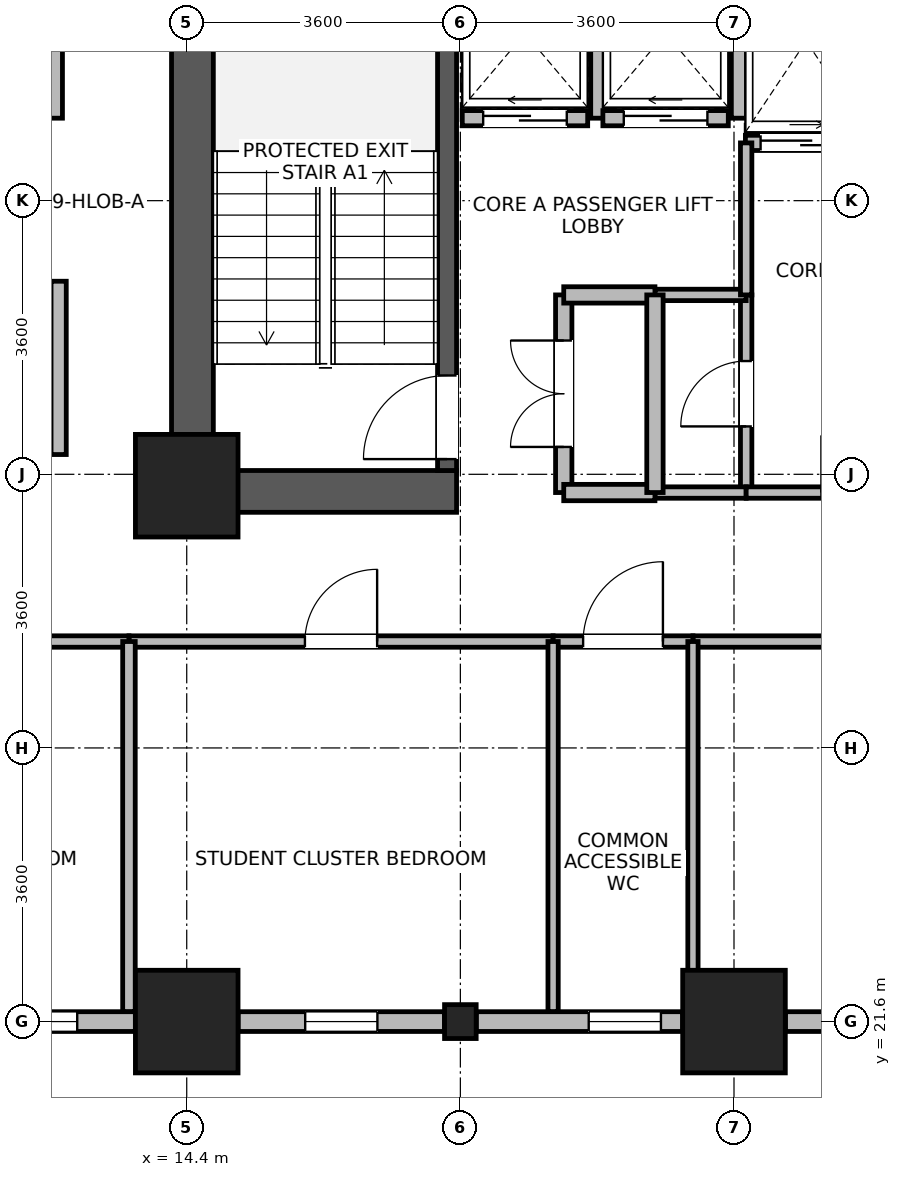
"""IFC4 building model, lengths in metres.
Left out: names, types, materials, properties, quantities, classifications, styles, units other than length and angle.
Written with IfcOpenShell. Run it as: python <this file> out.ifc"""

import sys

from ifc_helpers import new_model, si_unit, direction, frame, frame_2d, origin, origin_2d, place, context, subcontext, project, spatial, rectangle, i_section, extrude, source, transform, mapped, element, fill, save


model = new_model("IFC4")
c1 = context("Model", 3, precision=1e-05, world=origin(), true_north=direction((0.0, 1.0)))
c2 = subcontext(c1, "Body", "Model", "MODEL_VIEW")
j1 = project(units=[si_unit("LENGTHUNIT", "METRE"), si_unit("PLANEANGLEUNIT", "RADIAN")], contexts=[c1])
p1 = place(None, origin())
s1 = spatial("IfcSite", under=j1, at=p1, CompositionType="ELEMENT")
p2 = place(p1, origin())
s2 = spatial("IfcBuilding", under=s1, at=p2, CompositionType="ELEMENT")
p3 = place(p2, frame((0.0, 0.0, 40.1)))
s3 = spatial("IfcBuildingStorey", under=s2, at=p3, CompositionType="ELEMENT", Elevation=40.1)
p4 = place(p3, frame((14.475, 28.3, 0.0), z_axis=(0.0, 0.0, 1.0), x_axis=(0.0, 1.0, 0.0)))
e1 = element("IfcWall", 1, at=p4, inside=s3, PredefinedType="SHEAR", context=c2, shape_type="SweptSolid", body=[
    extrude(rectangle(XDim=8.1, YDim=0.55, at=frame_2d((4.05, 0.0))), origin(), (0.0, 0.0, 1.0), 3.45),
])
p5 = place(p3, frame((14.75, 28.575, 0.0), z_axis=(0.0, 0.0, 1.0), x_axis=(1.0, 0.0, 0.0)))
e2 = element("IfcWall", 2, at=p5, inside=s3, PredefinedType="SHEAR", context=c2, shape_type="SweptSolid", body=[
    extrude(rectangle(XDim=3.2, YDim=0.55, at=frame_2d((1.6, 0.0))), origin(), (0.0, 0.0, 1.0), 3.45),
])
p6 = place(p3, frame((17.825, 28.85, 0.0), z_axis=(0.0, 0.0, 1.0), x_axis=(0.0, 1.0, 0.0)))
e3 = element("IfcWall", 3, at=p6, inside=s3, PredefinedType="SHEAR", context=c2, shape_type="SweptSolid", body=[
    extrude(rectangle(XDim=7.0, YDim=0.25, at=frame_2d((3.5, 0.0))), origin(), (0.0, 0.0, 1.0), 3.45),
])
p7 = place(p6, frame((0.15, 0.0, 0.0)))
e4 = element("IfcOpeningElement", 4, at=p7, cuts=e3, PredefinedType="OPENING", context=c2, shape_type="SweptSolid", body=[
    extrude(rectangle(XDim=1.1, YDim=2.08, at=frame_2d((0.55, 1.04))), frame((0.0, 0.135, 0.0), z_axis=(0.0, -1.0, 0.0), x_axis=(1.0, 0.0, 0.0)), (0.0, 0.0, 1.0), 0.27),
])
m1 = source(origin(), c2, "Body", "SweptSolid", [
    extrude(rectangle(XDim=1.35, YDim=1.35, at=origin_2d()), origin(), (0.0, 0.0, 1.0), 3.7),
])
for number, where, z_axis, x_axis in (
    (5, (14.4, 21.6, 0.0), (0.0, 0.0, 1.0), (1.0, 0.0, 0.0)),
    (6, (14.4, 28.65, 0.0), (0.0, 0.0, 1.0), (1.0, 0.0, 0.0)),
    (7, (21.6, 21.6, 0.0), (0.0, 0.0, 1.0), (1.0, 0.0, 0.0)),
):
    element("IfcColumn", number, at=place(p3, frame(where, z_axis=z_axis, x_axis=x_axis)), inside=s3, PredefinedType="COLUMN", context=c2, shape_type="MappedRepresentation", body=[
        mapped(m1, transform((0.0, 0.0, 0.0), x_axis=(1.0, 0.0, 0.0), y_axis=(0.0, 1.0, 0.0), z_axis=(0.0, 0.0, 1.0), scale=1.0)),
    ])
m2 = source(origin(), c2, "Body", "SweptSolid", [
    extrude(i_section(OverallWidth=0.416, OverallDepth=0.446, WebThickness=0.029, FlangeThickness=0.04, FilletRadius=0.015, at=origin_2d()), origin(), (0.0, 0.0, 1.0), 3.7),
])
p8 = place(p3, frame((18.0, 21.6, 0.0), z_axis=(0.0, 0.0, 1.0), x_axis=(1.0, 0.0, 0.0)))
e8 = element("IfcColumn", 8, at=p8, inside=s3, PredefinedType="COLUMN", context=c2, shape_type="MappedRepresentation", body=[
    mapped(m2, transform((0.0, 0.0, 0.0), x_axis=(1.0, 0.0, 0.0), y_axis=(0.0, 1.0, 0.0), z_axis=(0.0, 0.0, 1.0), scale=1.0)),
])
p9 = place(p3, frame((13.724, 21.6, 0.0), z_axis=(0.0, 0.0, 1.0), x_axis=(-1.0, 0.0, 0.0)))
e9 = element("IfcWall", 9, at=p9, inside=s3, PredefinedType="STANDARD", context=c2, shape_type="SweptSolid", body=[
    extrude(rectangle(XDim=9.989, YDim=0.26, at=frame_2d((4.995, 0.0))), origin(), (0.0, 0.0, 1.0), 3.43),
])
p10 = place(p9, frame((0.765, 0.0, 0.85)))
e10 = element("IfcOpeningElement", 10, at=p10, cuts=e9, PredefinedType="OPENING", context=c2, shape_type="SweptSolid", body=[
    extrude(rectangle(XDim=1.8, YDim=1.85, at=frame_2d((0.9, 0.925))), frame((0.0, 0.14, 0.0), z_axis=(0.0, -1.0, 0.0), x_axis=(1.0, 0.0, 0.0)), (0.0, 0.0, 1.0), 0.28),
])
p11 = place(p9, frame((7.424, 0.0, 0.85)))
e11 = element("IfcOpeningElement", 11, at=p11, cuts=e9, PredefinedType="OPENING", context=c2, shape_type="SweptSolid", body=[
    extrude(rectangle(XDim=1.8, YDim=1.85, at=frame_2d((0.9, 0.925))), frame((0.0, 0.14, 0.0), z_axis=(0.0, -1.0, 0.0), x_axis=(1.0, 0.0, 0.0)), (0.0, 0.0, 1.0), 0.28),
])
p12 = place(p3, frame((17.791, 21.6, 0.0), z_axis=(0.0, 0.0, 1.0), x_axis=(-1.0, 0.0, 0.0)))
e12 = element("IfcWall", 12, at=p12, inside=s3, PredefinedType="STANDARD", context=c2, shape_type="SweptSolid", body=[
    extrude(rectangle(XDim=2.715, YDim=0.26, at=frame_2d((1.357, 0.0))), origin(), (0.0, 0.0, 1.0), 2.93),
])
p13 = place(p12, frame((0.883, 0.0, 0.85)))
e13 = element("IfcOpeningElement", 13, at=p13, cuts=e12, PredefinedType="OPENING", context=c2, shape_type="SweptSolid", body=[
    extrude(rectangle(XDim=0.95, YDim=1.75, at=frame_2d((0.475, 0.875))), frame((0.0, 0.14, 0.0), z_axis=(0.0, -1.0, 0.0), x_axis=(1.0, 0.0, 0.0)), (0.0, 0.0, 1.0), 0.28),
])
p14 = place(p3, frame((20.924, 21.6, 0.0), z_axis=(0.0, 0.0, 1.0), x_axis=(-1.0, 0.0, 0.0)))
e14 = element("IfcWall", 14, at=p14, inside=s3, PredefinedType="STANDARD", context=c2, shape_type="SweptSolid", body=[
    extrude(rectangle(XDim=2.715, YDim=0.26, at=frame_2d((1.357, 0.0))), origin(), (0.0, 0.0, 1.0), 2.93),
])
p15 = place(p14, frame((0.285, 0.0, 0.85)))
e15 = element("IfcOpeningElement", 15, at=p15, cuts=e14, PredefinedType="OPENING", context=c2, shape_type="SweptSolid", body=[
    extrude(rectangle(XDim=0.95, YDim=1.75, at=frame_2d((0.475, 0.875))), frame((0.0, 0.14, 0.0), z_axis=(0.0, -1.0, 0.0), x_axis=(1.0, 0.0, 0.0)), (0.0, 0.0, 1.0), 0.28),
])
p16 = place(p3, frame((24.991, 21.6, 0.0), z_axis=(0.0, 0.0, 1.0), x_axis=(-1.0, 0.0, 0.0)))
e16 = element("IfcWall", 16, at=p16, inside=s3, PredefinedType="STANDARD", context=c2, shape_type="SweptSolid", body=[
    extrude(rectangle(XDim=2.715, YDim=0.26, at=frame_2d((1.357, 0.0))), origin(), (0.0, 0.0, 1.0), 2.93),
])
p17 = place(p16, frame((0.883, 0.0, 0.85)))
e17 = element("IfcOpeningElement", 17, at=p17, cuts=e16, PredefinedType="OPENING", context=c2, shape_type="SweptSolid", body=[
    extrude(rectangle(XDim=0.95, YDim=1.75, at=frame_2d((0.475, 0.875))), frame((0.0, 0.14, 0.0), z_axis=(0.0, -1.0, 0.0), x_axis=(1.0, 0.0, 0.0)), (0.0, 0.0, 1.0), 0.28),
])
p18 = place(p3, frame((18.025, 33.485, 0.0), z_axis=(0.0, 0.0, 1.0), x_axis=(1.0, 0.0, 0.0)))
e18 = element("IfcWall", 18, at=p18, inside=s3, PredefinedType="PARTITIONING", context=c2, shape_type="SweptSolid", body=[
    extrude(rectangle(XDim=1.65, YDim=0.2, at=frame_2d((0.825, 0.0))), origin(), (0.0, 0.0, 1.0), 3.43),
])
p19 = place(p18, frame((0.275, 0.0, 0.0)))
e19 = element("IfcOpeningElement", 19, at=p19, cuts=e18, PredefinedType="OPENING", context=c2, shape_type="SweptSolid", body=[
    extrude(rectangle(XDim=1.1, YDim=2.12, at=frame_2d((0.55, 1.06))), frame((0.0, 0.11, 0.0), z_axis=(0.0, -1.0, 0.0), x_axis=(1.0, 0.0, 0.0)), (0.0, 0.0, 1.0), 0.22),
])
p20 = place(p3, frame((19.815, 33.485, 0.0), z_axis=(0.0, 0.0, 1.0), x_axis=(0.0, 1.0, 0.0)))
e20 = element("IfcWall", 20, at=p20, inside=s3, PredefinedType="PARTITIONING", context=c2, shape_type="SweptSolid", body=[
    extrude(rectangle(XDim=2.23, YDim=0.2, at=frame_2d((1.115, 0.0))), origin(), (0.0, 0.0, 1.0), 3.43),
])
p21 = place(p3, frame((19.875, 33.485, 0.0), z_axis=(0.0, 0.0, 1.0), x_axis=(1.0, 0.0, 0.0)))
e21 = element("IfcWall", 21, at=p21, inside=s3, PredefinedType="PARTITIONING", context=c2, shape_type="SweptSolid", body=[
    extrude(rectangle(XDim=1.65, YDim=0.2, at=frame_2d((0.825, 0.0))), origin(), (0.0, 0.0, 1.0), 3.43),
])
p22 = place(p21, frame((0.275, 0.0, 0.0)))
e22 = element("IfcOpeningElement", 22, at=p22, cuts=e21, PredefinedType="OPENING", context=c2, shape_type="SweptSolid", body=[
    extrude(rectangle(XDim=1.1, YDim=2.12, at=frame_2d((0.55, 1.06))), frame((0.0, 0.11, 0.0), z_axis=(0.0, -1.0, 0.0), x_axis=(1.0, 0.0, 0.0)), (0.0, 0.0, 1.0), 0.22),
])
p23 = place(p3, frame((21.665, 33.485, 0.0), z_axis=(0.0, 0.0, 1.0), x_axis=(0.0, 1.0, 0.0)))
e23 = element("IfcWall", 23, at=p23, inside=s3, PredefinedType="PARTITIONING", context=c2, shape_type="SweptSolid", body=[
    extrude(rectangle(XDim=2.23, YDim=0.2, at=frame_2d((1.115, 0.0))), origin(), (0.0, 0.0, 1.0), 3.43),
])
p24 = place(p3, frame((12.715, 29.06, 0.0), z_axis=(0.0, 0.0, 1.0), x_axis=(0.0, 1.0, 0.0)))
e24 = element("IfcWall", 24, at=p24, inside=s3, PredefinedType="PARTITIONING", context=c2, shape_type="SweptSolid", body=[
    extrude(rectangle(XDim=2.28, YDim=0.2, at=frame_2d((1.14, 0.0))), origin(), (0.0, 0.0, 1.0), 3.43),
])
p25 = place(p3, frame((12.665, 33.485, 0.0), z_axis=(0.0, 0.0, 1.0), x_axis=(0.0, 1.0, 0.0)))
e25 = element("IfcWall", 25, at=p25, inside=s3, PredefinedType="PARTITIONING", context=c2, shape_type="SweptSolid", body=[
    extrude(rectangle(XDim=2.23, YDim=0.2, at=frame_2d((1.115, 0.0))), origin(), (0.0, 0.0, 1.0), 3.43),
])
p26 = place(p3, frame((21.75, 33.16, 0.0), z_axis=(0.0, 0.0, 1.0), x_axis=(1.0, 0.0, 0.0)))
e26 = element("IfcWall", 26, at=p26, inside=s3, PredefinedType="PARTITIONING", context=c2, shape_type="SweptSolid", body=[
    extrude(rectangle(XDim=1.6, YDim=0.2, at=frame_2d((0.8, 0.0))), origin(), (0.0, 0.0, 1.0), 3.43),
])
p27 = place(p26, frame((0.2, 0.0, 0.0)))
e27 = element("IfcOpeningElement", 27, at=p27, cuts=e26, PredefinedType="OPENING", context=c2, shape_type="SweptSolid", body=[
    extrude(rectangle(XDim=1.2, YDim=2.12, at=frame_2d((0.6, 1.06))), frame((0.0, 0.11, 0.0), z_axis=(0.0, -1.0, 0.0), x_axis=(1.0, 0.0, 0.0)), (0.0, 0.0, 1.0), 0.22),
])
p28 = place(p3, frame((21.06, 26.6, 0.0), z_axis=(0.0, 0.0, 1.0), x_axis=(1.0, 0.0, 0.0)))
e28 = element("IfcWall", 28, at=p28, inside=s3, PredefinedType="PARTITIONING", context=c2, shape_type="SweptSolid", body=[
    extrude(rectangle(XDim=12.3, YDim=0.15, at=frame_2d((6.15, 0.0))), origin(), (0.0, 0.0, 1.0), 3.43),
])
p29 = place(p28, frame((5.5, 0.0, 0.0)))
e29 = element("IfcOpeningElement", 29, at=p29, cuts=e28, PredefinedType="OPENING", context=c2, shape_type="SweptSolid", body=[
    extrude(rectangle(XDim=1.3, YDim=2.12, at=frame_2d((0.65, 1.06))), frame((0.0, 0.085, 0.0), z_axis=(0.0, -1.0, 0.0), x_axis=(1.0, 0.0, 0.0)), (0.0, 0.0, 1.0), 0.17),
])
p30 = place(p3, frame((13.64, 26.6, 0.0), z_axis=(0.0, 0.0, 1.0), x_axis=(1.0, 0.0, 0.0)))
e30 = element("IfcWall", 30, at=p30, inside=s3, PredefinedType="PARTITIONING", context=c2, shape_type="SweptSolid", body=[
    extrude(rectangle(XDim=5.58, YDim=0.15, at=frame_2d((2.79, 0.0))), origin(), (0.0, 0.0, 1.0), 3.43),
])
p31 = place(p30, frame((2.315, 0.0, 0.0)))
e31 = element("IfcOpeningElement", 31, at=p31, cuts=e30, PredefinedType="OPENING", context=c2, shape_type="SweptSolid", body=[
    extrude(rectangle(XDim=0.95, YDim=2.1, at=frame_2d((0.475, 1.05))), frame((0.0, 0.085, 0.0), z_axis=(0.0, -1.0, 0.0), x_axis=(1.0, 0.0, 0.0)), (0.0, 0.0, 1.0), 0.17),
])
p32 = place(p3, frame((8.44, 26.6, 0.0), z_axis=(0.0, 0.0, 1.0), x_axis=(1.0, 0.0, 0.0)))
e32 = element("IfcWall", 32, at=p32, inside=s3, PredefinedType="PARTITIONING", context=c2, shape_type="SweptSolid", body=[
    extrude(rectangle(XDim=5.2, YDim=0.15, at=frame_2d((2.6, 0.0))), origin(), (0.0, 0.0, 1.0), 3.43),
])
p33 = place(p32, frame((2.125, 0.0, 0.0)))
e33 = element("IfcOpeningElement", 33, at=p33, cuts=e32, PredefinedType="OPENING", context=c2, shape_type="SweptSolid", body=[
    extrude(rectangle(XDim=0.95, YDim=2.1, at=frame_2d((0.475, 1.05))), frame((0.0, 0.085, 0.0), z_axis=(0.0, -1.0, 0.0), x_axis=(1.0, 0.0, 0.0)), (0.0, 0.0, 1.0), 0.17),
])
p34 = place(p3, frame((19.36, 28.56, 0.0), z_axis=(0.0, 0.0, 1.0), x_axis=(0.0, 1.0, 0.0)))
e34 = element("IfcWall", 34, at=p34, inside=s3, PredefinedType="PARTITIONING", context=c2, shape_type="SweptSolid", body=[
    extrude(rectangle(XDim=2.6, YDim=0.215, at=frame_2d((1.3, 0.0))), origin(), (0.0, 0.0, 1.0), 3.43),
])
p35 = place(p34, frame((0.6, 0.0, 0.0)))
e35 = element("IfcOpeningElement", 35, at=p35, cuts=e34, PredefinedType="OPENING", context=c2, shape_type="SweptSolid", body=[
    extrude(rectangle(XDim=1.4, YDim=2.15, at=frame_2d((0.7, 1.075))), frame((0.0, 0.118, 0.0), z_axis=(0.0, -1.0, 0.0), x_axis=(1.0, 0.0, 0.0)), (0.0, 0.0, 1.0), 0.235),
])
p36 = place(p3, frame((21.76, 28.56, 0.0), z_axis=(0.0, 0.0, 1.0), x_axis=(0.0, 1.0, 0.0)))
e36 = element("IfcWall", 36, at=p36, inside=s3, PredefinedType="PARTITIONING", context=c2, shape_type="SweptSolid", body=[
    extrude(rectangle(XDim=2.6, YDim=0.15, at=frame_2d((1.3, 0.0))), origin(), (0.0, 0.0, 1.0), 3.43),
])
p37 = place(p36, frame((0.87, 0.0, 0.0)))
e37 = element("IfcOpeningElement", 37, at=p37, cuts=e36, PredefinedType="OPENING", context=c2, shape_type="SweptSolid", body=[
    extrude(rectangle(XDim=0.86, YDim=2.02, at=frame_2d((0.43, 1.01))), frame((0.0, 0.085, 0.0), z_axis=(0.0, -1.0, 0.0), x_axis=(1.0, 0.0, 0.0)), (0.0, 0.0, 1.0), 0.17),
])
p38 = place(p3, frame((19.22, 26.6, 0.0), z_axis=(0.0, 0.0, 1.0), x_axis=(1.0, 0.0, 0.0)))
e38 = element("IfcWall", 38, at=p38, inside=s3, PredefinedType="PARTITIONING", context=c2, shape_type="SweptSolid", body=[
    extrude(rectangle(XDim=1.84, YDim=0.15, at=frame_2d((0.92, 0.0))), origin(), (0.0, 0.0, 1.0), 3.43),
])
p39 = place(p38, frame((0.395, 0.0, 0.0)))
e39 = element("IfcOpeningElement", 39, at=p39, cuts=e38, PredefinedType="OPENING", context=c2, shape_type="SweptSolid", body=[
    extrude(rectangle(XDim=1.05, YDim=2.12, at=frame_2d((0.525, 1.06))), frame((0.0, 0.085, 0.0), z_axis=(0.0, -1.0, 0.0), x_axis=(1.0, 0.0, 0.0)), (0.0, 0.0, 1.0), 0.17),
])
p40 = place(p3, frame((20.56, 28.56, 0.0), z_axis=(0.0, 0.0, 1.0), x_axis=(1.0, 0.0, 0.0)))
e40 = element("IfcWall", 40, at=p40, inside=s3, PredefinedType="PARTITIONING", context=c2, shape_type="SweptSolid", body=[
    extrude(rectangle(XDim=1.2, YDim=0.15, at=frame_2d((0.6, 0.0))), origin(), (0.0, 0.0, 1.0), 2.23),
])
p41 = place(p3, frame((20.56, 31.16, 0.0), z_axis=(0.0, 0.0, 1.0), x_axis=(1.0, 0.0, 0.0)))
e41 = element("IfcWall", 41, at=p41, inside=s3, PredefinedType="PARTITIONING", context=c2, shape_type="SweptSolid", body=[
    extrude(rectangle(XDim=1.2, YDim=0.15, at=frame_2d((0.6, 0.0))), origin(), (0.0, 0.0, 1.0), 3.43),
])
p42 = place(p3, frame((19.36, 28.56, 0.0), z_axis=(0.0, 0.0, 1.0), x_axis=(1.0, 0.0, 0.0)))
e42 = element("IfcWall", 42, at=p42, inside=s3, PredefinedType="PARTITIONING", context=c2, shape_type="SweptSolid", body=[
    extrude(rectangle(XDim=1.2, YDim=0.215, at=frame_2d((0.6, 0.0))), origin(), (0.0, 0.0, 1.0), 2.23),
])
p43 = place(p3, frame((19.36, 31.16, 0.0), z_axis=(0.0, 0.0, 1.0), x_axis=(1.0, 0.0, 0.0)))
e43 = element("IfcWall", 43, at=p43, inside=s3, PredefinedType="PARTITIONING", context=c2, shape_type="SweptSolid", body=[
    extrude(rectangle(XDim=1.2, YDim=0.215, at=frame_2d((0.6, 0.0))), origin(), (0.0, 0.0, 1.0), 3.43),
])
p44 = place(p3, frame((13.64, 21.732, 0.0), z_axis=(0.0, 0.0, 1.0), x_axis=(0.0, 1.0, 0.0)))
e44 = element("IfcWall", 44, at=p44, inside=s3, PredefinedType="PARTITIONING", context=c2, shape_type="SweptSolid", body=[
    extrude(rectangle(XDim=4.868, YDim=0.165, at=frame_2d((2.434, 0.0))), origin(), (0.0, 0.0, 1.0), 3.43),
])
for number, where, z_axis, x_axis in (
    (45, (19.22, 21.732, 0.0), (0.0, 0.0, 1.0), (0.0, 1.0, 0.0)),
    (46, (21.06, 21.732, 0.0), (0.0, 0.0, 1.0), (0.0, 1.0, 0.0)),
):
    element("IfcWall", number, at=place(p3, frame(where, z_axis=z_axis, x_axis=x_axis)), inside=s3, PredefinedType="PARTITIONING", context=c2, shape_type="SweptSolid", body=[
        extrude(rectangle(XDim=4.868, YDim=0.135, at=frame_2d((2.434, 0.0))), origin(), (0.0, 0.0, 1.0), 3.43),
    ])
p45 = place(p3, frame((21.76, 28.56, 0.0), z_axis=(0.0, 0.0, 1.0), x_axis=(1.0, 0.0, 0.0)))
e47 = element("IfcWall", 47, at=p45, inside=s3, PredefinedType="PARTITIONING", context=c2, shape_type="SweptSolid", body=[
    extrude(rectangle(XDim=3.48, YDim=0.15, at=frame_2d((1.74, 0.0))), origin(), (0.0, 0.0, 1.0), 2.23),
])
p46 = place(p45, frame((0.99, 0.0, 0.0)))
e48 = element("IfcOpeningElement", 48, at=p46, cuts=e47, PredefinedType="OPENING", context=c2, shape_type="SweptSolid", body=[
    extrude(rectangle(XDim=1.5, YDim=2.1, at=frame_2d((0.75, 1.05))), frame((0.0, 0.085, 0.0), z_axis=(0.0, -1.0, 0.0), x_axis=(1.0, 0.0, 0.0)), (0.0, 0.0, 1.0), 0.17),
])
p47 = place(p3, frame((20.56, 28.56, 0.0), z_axis=(0.0, 0.0, 1.0), x_axis=(0.0, 1.0, 0.0)))
e49 = element("IfcWall", 49, at=p47, inside=s3, PredefinedType="PARTITIONING", context=c2, shape_type="SweptSolid", body=[
    extrude(rectangle(XDim=2.6, YDim=0.215, at=frame_2d((1.3, 0.0))), origin(), (0.0, 0.0, 1.0), 3.43),
])
p48 = place(p3, frame((21.76, 31.16, 0.0), z_axis=(0.0, 0.0, 1.0), x_axis=(0.0, 1.0, 0.0)))
e50 = element("IfcWall", 50, at=p48, inside=s3, PredefinedType="PARTITIONING", context=c2, shape_type="SweptSolid", body=[
    extrude(rectangle(XDim=2.0, YDim=0.15, at=frame_2d((1.0, 0.0))), origin(), (0.0, 0.0, 1.0), 3.43),
])
p49 = place(p10, origin())
e51 = element("IfcWindow", 51, at=p49, inside=s3, PartitioningType="SINGLE_PANEL", PredefinedType="WINDOW", context=c2, shape_type="SweptSolid", body=[
    extrude(rectangle(XDim=1.8, YDim=1.85, at=frame_2d((0.9, 0.925))), frame((0.0, 0.03, 0.0), z_axis=(0.0, -1.0, 0.0), x_axis=(1.0, 0.0, 0.0)), (0.0, 0.0, 1.0), 0.06),
])
fill(e10, e51)
p50 = place(p13, origin())
e52 = element("IfcWindow", 52, at=p50, inside=s3, PartitioningType="SINGLE_PANEL", PredefinedType="WINDOW", context=c2, shape_type="SweptSolid", body=[
    extrude(rectangle(XDim=0.95, YDim=1.75, at=frame_2d((0.475, 0.875))), frame((0.0, 0.03, 0.0), z_axis=(0.0, -1.0, 0.0), x_axis=(1.0, 0.0, 0.0)), (0.0, 0.0, 1.0), 0.06),
])
fill(e13, e52)
p51 = place(p15, origin())
e53 = element("IfcWindow", 53, at=p51, inside=s3, PartitioningType="SINGLE_PANEL", PredefinedType="WINDOW", context=c2, shape_type="SweptSolid", body=[
    extrude(rectangle(XDim=0.95, YDim=1.75, at=frame_2d((0.475, 0.875))), frame((0.0, 0.03, 0.0), z_axis=(0.0, -1.0, 0.0), x_axis=(1.0, 0.0, 0.0)), (0.0, 0.0, 1.0), 0.06),
])
fill(e15, e53)
p52 = place(p7, origin())
e54 = element("IfcDoor", 54, at=p52, inside=s3, OperationType="SINGLE_SWING_LEFT", PredefinedType="DOOR", context=c2, shape_type="SweptSolid", body=[
    extrude(rectangle(XDim=1.1, YDim=2.08, at=frame_2d((0.55, 1.04))), frame((0.0, 0.025, 0.0), z_axis=(0.0, -1.0, 0.0), x_axis=(1.0, 0.0, 0.0)), (0.0, 0.0, 1.0), 0.05),
])
fill(e4, e54)
p53 = place(p19, origin())
e55 = element("IfcDoor", 55, at=p53, inside=s3, OperationType="SLIDING_TO_LEFT", PredefinedType="DOOR", context=c2, shape_type="SweptSolid", body=[
    extrude(rectangle(XDim=1.1, YDim=2.12, at=frame_2d((0.55, 1.06))), frame((0.0, 0.025, 0.0), z_axis=(0.0, -1.0, 0.0), x_axis=(1.0, 0.0, 0.0)), (0.0, 0.0, 1.0), 0.05),
])
fill(e19, e55)
p54 = place(p22, origin())
e56 = element("IfcDoor", 56, at=p54, inside=s3, OperationType="SLIDING_TO_LEFT", PredefinedType="DOOR", context=c2, shape_type="SweptSolid", body=[
    extrude(rectangle(XDim=1.1, YDim=2.12, at=frame_2d((0.55, 1.06))), frame((0.0, 0.025, 0.0), z_axis=(0.0, -1.0, 0.0), x_axis=(1.0, 0.0, 0.0)), (0.0, 0.0, 1.0), 0.05),
])
fill(e22, e56)
p55 = place(p27, origin())
e57 = element("IfcDoor", 57, at=p55, inside=s3, OperationType="SLIDING_TO_RIGHT", PredefinedType="DOOR", context=c2, shape_type="SweptSolid", body=[
    extrude(rectangle(XDim=1.2, YDim=2.12, at=frame_2d((0.6, 1.06))), frame((0.0, 0.025, 0.0), z_axis=(0.0, -1.0, 0.0), x_axis=(1.0, 0.0, 0.0)), (0.0, 0.0, 1.0), 0.05),
])
fill(e27, e57)
p56 = place(p31, origin())
e58 = element("IfcDoor", 58, at=p56, inside=s3, OperationType="SINGLE_SWING_RIGHT", PredefinedType="DOOR", context=c2, shape_type="SweptSolid", body=[
    extrude(rectangle(XDim=0.95, YDim=2.1, at=frame_2d((0.475, 1.05))), frame((0.0, 0.025, 0.0), z_axis=(0.0, -1.0, 0.0), x_axis=(1.0, 0.0, 0.0)), (0.0, 0.0, 1.0), 0.05),
])
fill(e31, e58)
p57 = place(p35, origin())
e59 = element("IfcDoor", 59, at=p57, inside=s3, OperationType="DOUBLE_DOOR_SINGLE_SWING", PredefinedType="DOOR", context=c2, shape_type="SweptSolid", body=[
    extrude(rectangle(XDim=1.4, YDim=2.15, at=frame_2d((0.7, 1.075))), frame((0.0, 0.025, 0.0), z_axis=(0.0, -1.0, 0.0), x_axis=(1.0, 0.0, 0.0)), (0.0, 0.0, 1.0), 0.05),
])
fill(e35, e59)
p58 = place(p37, origin())
e60 = element("IfcDoor", 60, at=p58, inside=s3, OperationType="SINGLE_SWING_LEFT", PredefinedType="DOOR", context=c2, shape_type="SweptSolid", body=[
    extrude(rectangle(XDim=0.86, YDim=2.02, at=frame_2d((0.43, 1.01))), frame((0.0, 0.025, 0.0), z_axis=(0.0, -1.0, 0.0), x_axis=(1.0, 0.0, 0.0)), (0.0, 0.0, 1.0), 0.05),
])
fill(e37, e60)
p59 = place(p39, origin())
e61 = element("IfcDoor", 61, at=p59, inside=s3, OperationType="SINGLE_SWING_RIGHT", PredefinedType="DOOR", context=c2, shape_type="SweptSolid", body=[
    extrude(rectangle(XDim=1.05, YDim=2.12, at=frame_2d((0.525, 1.06))), frame((0.0, 0.025, 0.0), z_axis=(0.0, -1.0, 0.0), x_axis=(1.0, 0.0, 0.0)), (0.0, 0.0, 1.0), 0.05),
])
fill(e39, e61)
save(model, sys.argv[1])
